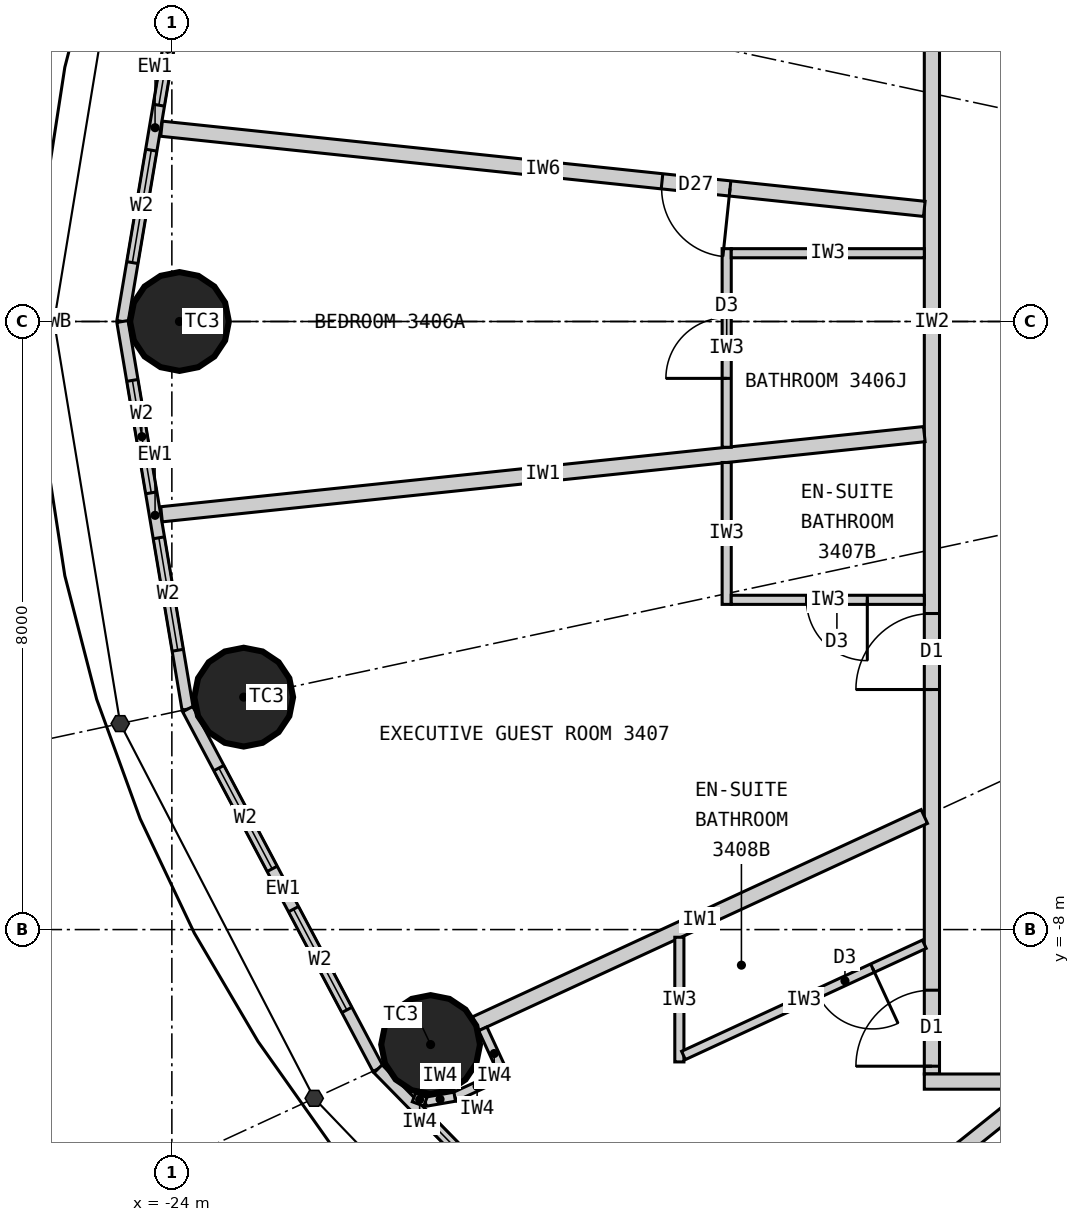
"""IFC4 building model, lengths in metres.
Left out: names, types, materials, properties, quantities, classifications, styles, units other than length and angle.
Written with IfcOpenShell. Run it as: python <this file> out.ifc"""

import sys

from ifc_helpers import new_model, si_unit, direction, frame, frame_2d, origin, origin_2d, place, context, subcontext, project, spatial, rectangle, circle, extrude, element, fill, save


model = new_model("IFC4")
c1 = context("Model", 3, precision=1e-05, world=origin(), true_north=direction((0.0, 1.0)))
c2 = subcontext(c1, "Body", "Model", "MODEL_VIEW")
j1 = project(units=[si_unit("LENGTHUNIT", "METRE"), si_unit("PLANEANGLEUNIT", "RADIAN")], contexts=[c1])
p1 = place(None, origin())
s1 = spatial("IfcSite", under=j1, at=p1, CompositionType="ELEMENT")
p2 = place(p1, origin())
s2 = spatial("IfcBuilding", under=s1, at=p2, CompositionType="ELEMENT")
p3 = place(p2, frame((0.0, 0.0, 132.0)))
s3 = spatial("IfcBuildingStorey", under=s2, at=p3, CompositionType="ELEMENT", Elevation=132.0)
for number, where, z_axis, x_axis in (
    (1, (-23.9, 0.0, 0.0), (0.0, 0.0, 1.0), (1.0, 0.0, 0.0)),
    (2, (-23.055, -4.942, 0.0), (0.0, 0.0, 1.0), (1.0, 0.0, 0.0)),
    (3, (-20.596, -9.513, 0.0), (0.0, 0.0, 1.0), (1.0, 0.0, 0.0)),
):
    element("IfcColumn", number, at=place(p3, frame(where, z_axis=z_axis, x_axis=x_axis)), inside=s3, PredefinedType="COLUMN", context=c2, shape_type="SweptSolid", body=[
        extrude(circle(Radius=0.65, at=origin_2d()), origin(), (0.0, 0.0, 1.0), 3.3),
    ])
p4 = place(p3, frame((-23.792, 5.1, 0.0), z_axis=(0.0, 0.0, 1.0), x_axis=(-0.165883894218, -0.986145290329, 0.0)))
e4 = element("IfcWall", 4, at=p4, inside=s3, PredefinedType="ELEMENTEDWALL", context=c2, shape_type="SweptSolid", body=[
    extrude(rectangle(XDim=5.172, YDim=0.15, at=frame_2d((2.586, 0.0))), origin(), (0.0, 0.0, 1.0), 3.12),
])
p5 = place(p4, frame((0.786, 0.0, 0.9)))
e5 = element("IfcOpeningElement", 5, at=p5, cuts=e4, PredefinedType="OPENING", context=c2, shape_type="SweptSolid", body=[
    extrude(rectangle(XDim=1.5, YDim=1.9, at=frame_2d((0.75, 0.95))), frame((0.0, 0.085, 0.0), z_axis=(0.0, -1.0, 0.0), x_axis=(1.0, 0.0, 0.0)), (0.0, 0.0, 1.0), 0.17),
])
p6 = place(p4, frame((2.886, 0.0, 0.9)))
e6 = element("IfcOpeningElement", 6, at=p6, cuts=e4, PredefinedType="OPENING", context=c2, shape_type="SweptSolid", body=[
    extrude(rectangle(XDim=1.5, YDim=1.9, at=frame_2d((0.75, 0.95))), frame((0.0, 0.085, 0.0), z_axis=(0.0, -1.0, 0.0), x_axis=(1.0, 0.0, 0.0)), (0.0, 0.0, 1.0), 0.17),
])
p7 = place(p3, frame((-24.65, 0.0, 0.0), z_axis=(0.0, 0.0, 1.0), x_axis=(0.165883894218, -0.986145290329, 0.0)))
e7 = element("IfcWall", 7, at=p7, inside=s3, PredefinedType="ELEMENTEDWALL", context=c2, shape_type="SweptSolid", body=[
    extrude(rectangle(XDim=5.172, YDim=0.15, at=frame_2d((2.586, 0.0))), origin(), (0.0, 0.0, 1.0), 3.12),
])
p8 = place(p7, frame((0.786, 0.0, 0.9)))
e8 = element("IfcOpeningElement", 8, at=p8, cuts=e7, PredefinedType="OPENING", context=c2, shape_type="SweptSolid", body=[
    extrude(rectangle(XDim=1.5, YDim=1.9, at=frame_2d((0.75, 0.95))), frame((0.0, 0.085, 0.0), z_axis=(0.0, -1.0, 0.0), x_axis=(1.0, 0.0, 0.0)), (0.0, 0.0, 1.0), 0.17),
])
p9 = place(p7, frame((2.886, 0.0, 0.9)))
e9 = element("IfcOpeningElement", 9, at=p9, cuts=e7, PredefinedType="OPENING", context=c2, shape_type="SweptSolid", body=[
    extrude(rectangle(XDim=1.5, YDim=1.9, at=frame_2d((0.75, 0.95))), frame((0.0, 0.085, 0.0), z_axis=(0.0, -1.0, 0.0), x_axis=(1.0, 0.0, 0.0)), (0.0, 0.0, 1.0), 0.17),
])
p10 = place(p3, frame((-23.792, -5.1, 0.0), z_axis=(0.0, 0.0, 1.0), x_axis=(0.467814388454, -0.883826735257, 0.0)))
e10 = element("IfcWall", 10, at=p10, inside=s3, PredefinedType="ELEMENTEDWALL", context=c2, shape_type="SweptSolid", body=[
    extrude(rectangle(XDim=5.354, YDim=0.15, at=frame_2d((2.677, 0.0))), origin(), (0.0, 0.0, 1.0), 3.12),
])
p11 = place(p10, frame((0.877, 0.0, 0.9)))
e11 = element("IfcOpeningElement", 11, at=p11, cuts=e10, PredefinedType="OPENING", context=c2, shape_type="SweptSolid", body=[
    extrude(rectangle(XDim=1.5, YDim=1.9, at=frame_2d((0.75, 0.95))), frame((0.0, 0.085, 0.0), z_axis=(0.0, -1.0, 0.0), x_axis=(1.0, 0.0, 0.0)), (0.0, 0.0, 1.0), 0.17),
])
p12 = place(p10, frame((2.977, 0.0, 0.9)))
e12 = element("IfcOpeningElement", 12, at=p12, cuts=e10, PredefinedType="OPENING", context=c2, shape_type="SweptSolid", body=[
    extrude(rectangle(XDim=1.5, YDim=1.9, at=frame_2d((0.75, 0.95))), frame((0.0, 0.085, 0.0), z_axis=(0.0, -1.0, 0.0), x_axis=(1.0, 0.0, 0.0)), (0.0, 0.0, 1.0), 0.17),
])
p13 = place(p3, frame((-21.287, -9.832, 0.0), z_axis=(0.0, 0.0, 1.0), x_axis=(0.700136650834, -0.714008872605, 0.0)))
e13 = element("IfcWall", 13, at=p13, inside=s3, PredefinedType="ELEMENTEDWALL", context=c2, shape_type="SweptSolid", body=[
    extrude(rectangle(XDim=5.649, YDim=0.15, at=frame_2d((2.825, 0.0))), origin(), (0.0, 0.0, 1.0), 3.12),
])
p14 = place(p13, frame((1.025, 0.0, 0.9)))
e14 = element("IfcOpeningElement", 14, at=p14, cuts=e13, PredefinedType="OPENING", context=c2, shape_type="SweptSolid", body=[
    extrude(rectangle(XDim=1.5, YDim=1.9, at=frame_2d((0.75, 0.95))), frame((0.0, 0.085, 0.0), z_axis=(0.0, -1.0, 0.0), x_axis=(1.0, 0.0, 0.0)), (0.0, 0.0, 1.0), 0.17),
])
p15 = place(p13, frame((3.125, 0.0, 0.9)))
e15 = element("IfcOpeningElement", 15, at=p15, cuts=e13, PredefinedType="OPENING", context=c2, shape_type="SweptSolid", body=[
    extrude(rectangle(XDim=1.5, YDim=1.9, at=frame_2d((0.75, 0.95))), frame((0.0, 0.085, 0.0), z_axis=(0.0, -1.0, 0.0), x_axis=(1.0, 0.0, 0.0)), (0.0, 0.0, 1.0), 0.17),
])
p16 = place(p3, frame((-14.0, 9.9, 0.0), z_axis=(0.0, 0.0, 1.0), x_axis=(0.0, -1.0, 0.0)))
e16 = element("IfcWall", 16, at=p16, inside=s3, PredefinedType="PARTITIONING", context=c2, shape_type="SweptSolid", body=[
    extrude(rectangle(XDim=19.8, YDim=0.2, at=frame_2d((9.9, 0.0))), origin(), (0.0, 0.0, 1.0), 3.12),
])
p17 = place(p16, frame((2.822, 0.0, 0.0)))
e17 = element("IfcOpeningElement", 17, at=p17, cuts=e16, PredefinedType="OPENING", context=c2, shape_type="SweptSolid", body=[
    extrude(rectangle(XDim=1.0, YDim=2.2, at=frame_2d((0.5, 1.1))), frame((0.0, 0.11, 0.0), z_axis=(0.0, -1.0, 0.0), x_axis=(1.0, 0.0, 0.0)), (0.0, 0.0, 1.0), 0.22),
])
p18 = place(p16, frame((13.742, 0.0, 0.0)))
e18 = element("IfcOpeningElement", 18, at=p18, cuts=e16, PredefinedType="OPENING", context=c2, shape_type="SweptSolid", body=[
    extrude(rectangle(XDim=1.0, YDim=2.2, at=frame_2d((0.5, 1.1))), frame((0.0, 0.11, 0.0), z_axis=(0.0, -1.0, 0.0), x_axis=(1.0, 0.0, 0.0)), (0.0, 0.0, 1.0), 0.22),
])
p19 = place(p16, frame((18.698, 0.0, 0.0)))
e19 = element("IfcOpeningElement", 19, at=p19, cuts=e16, PredefinedType="OPENING", context=c2, shape_type="SweptSolid", body=[
    extrude(rectangle(XDim=1.0, YDim=2.2, at=frame_2d((0.5, 1.1))), frame((0.0, 0.11, 0.0), z_axis=(0.0, -1.0, 0.0), x_axis=(1.0, 0.0, 0.0)), (0.0, 0.0, 1.0), 0.22),
])
p20 = place(p3, frame((-3.283, -10.0, 0.0), z_axis=(0.0, 0.0, 1.0), x_axis=(-1.0, 0.0, 0.0)))
e20 = element("IfcWall", 20, at=p20, inside=s3, PredefinedType="PARTITIONING", context=c2, shape_type="SweptSolid", body=[
    extrude(rectangle(XDim=10.817, YDim=0.2, at=frame_2d((5.409, 0.0))), origin(), (0.0, 0.0, 1.0), 3.12),
])
p21 = place(p20, frame((6.482, 0.0, 0.0)))
e21 = element("IfcOpeningElement", 21, at=p21, cuts=e20, PredefinedType="OPENING", context=c2, shape_type="SweptSolid", body=[
    extrude(rectangle(XDim=1.0, YDim=2.2, at=frame_2d((0.5, 1.1))), frame((0.0, 0.11, 0.0), z_axis=(0.0, -1.0, 0.0), x_axis=(1.0, 0.0, 0.0)), (0.0, 0.0, 1.0), 0.22),
])
p22 = place(p3, frame((-14.1, 1.482, 0.0), z_axis=(0.0, 0.0, 1.0), x_axis=(-0.994523202615, 0.104516024894, 0.0)))
e22 = element("IfcWall", 22, at=p22, inside=s3, PredefinedType="PARTITIONING", context=c2, shape_type="SweptSolid", body=[
    extrude(rectangle(XDim=10.091, YDim=0.2, at=frame_2d((5.045, 0.0))), origin(), (0.0, 0.0, 1.0), 2.37),
])
p23 = place(p22, frame((2.57, 0.0, 0.0)))
e23 = element("IfcOpeningElement", 23, at=p23, cuts=e22, PredefinedType="OPENING", context=c2, shape_type="SweptSolid", body=[
    extrude(rectangle(XDim=0.9, YDim=2.1, at=frame_2d((0.45, 1.05))), frame((0.0, 0.11, 0.0), z_axis=(0.0, -1.0, 0.0), x_axis=(1.0, 0.0, 0.0)), (0.0, 0.0, 1.0), 0.22),
])
p24 = place(p3, frame((-14.1, -1.482, 0.0), z_axis=(0.0, 0.0, 1.0), x_axis=(-0.994523202615, -0.104516024894, 0.0)))
e24 = element("IfcWall", 24, at=p24, inside=s3, PredefinedType="PARTITIONING", context=c2, shape_type="SweptSolid", body=[
    extrude(rectangle(XDim=10.091, YDim=0.2, at=frame_2d((5.045, 0.0))), origin(), (0.0, 0.0, 1.0), 2.37),
])
p25 = place(p3, frame((-14.1, -6.512, 0.0), z_axis=(0.0, 0.0, 1.0), x_axis=(-0.907833019998, -0.419331858797, 0.0)))
e25 = element("IfcWall", 25, at=p25, inside=s3, PredefinedType="PARTITIONING", context=c2, shape_type="SweptSolid", body=[
    extrude(rectangle(XDim=6.505, YDim=0.2, at=frame_2d((3.252, 0.0))), origin(), (0.0, 0.0, 1.0), 2.22),
])
p26 = place(p3, frame((-12.625, -10.1, 0.0), z_axis=(0.0, 0.0, 1.0), x_axis=(-0.780863644897, -0.624701503182, 0.0)))
e26 = element("IfcWall", 26, at=p26, inside=s3, PredefinedType="PARTITIONING", context=c2, shape_type="SweptSolid", body=[
    extrude(rectangle(XDim=4.612, YDim=0.2, at=frame_2d((2.306, 0.0))), origin(), (0.0, 0.0, 1.0), 2.27),
])
p27 = place(p3, frame((-16.7, -1.655, 0.0), z_axis=(0.0, 0.0, 1.0), x_axis=(0.0, 1.0, 0.0)))
e27 = element("IfcWall", 27, at=p27, inside=s3, PredefinedType="PARTITIONING", context=c2, shape_type="SweptSolid", body=[
    extrude(rectangle(XDim=2.613, YDim=0.12, at=frame_2d((1.307, 0.0))), origin(), (0.0, 0.0, 1.0), 3.12),
])
p28 = place(p27, frame((0.906, 0.0, 0.0)))
e28 = element("IfcOpeningElement", 28, at=p28, cuts=e27, PredefinedType="OPENING", context=c2, shape_type="SweptSolid", body=[
    extrude(rectangle(XDim=0.8, YDim=2.1, at=frame_2d((0.4, 1.05))), frame((0.0, 0.07, 0.0), z_axis=(0.0, -1.0, 0.0), x_axis=(1.0, 0.0, 0.0)), (0.0, 0.0, 1.0), 0.14),
])
p29 = place(p3, frame((-14.1, 0.898, 0.0), z_axis=(0.0, 0.0, 1.0), x_axis=(-1.0, 0.0, 0.0)))
e29 = element("IfcWall", 29, at=p29, inside=s3, PredefinedType="PARTITIONING", context=c2, shape_type="SweptSolid", body=[
    extrude(rectangle(XDim=2.54, YDim=0.12, at=frame_2d((1.27, 0.0))), origin(), (0.0, 0.0, 1.0), 3.12),
])
p30 = place(p3, frame((-16.7, -1.855, 0.0), z_axis=(0.0, 0.0, 1.0), x_axis=(0.0, -1.0, 0.0)))
e30 = element("IfcWall", 30, at=p30, inside=s3, PredefinedType="PARTITIONING", context=c2, shape_type="SweptSolid", body=[
    extrude(rectangle(XDim=1.867, YDim=0.12, at=frame_2d((0.933, 0.0))), origin(), (0.0, 0.0, 1.0), 3.12),
])
p31 = place(p3, frame((-14.1, -3.662, 0.0), z_axis=(0.0, 0.0, 1.0), x_axis=(-1.0, 0.0, 0.0)))
e31 = element("IfcWall", 31, at=p31, inside=s3, PredefinedType="PARTITIONING", context=c2, shape_type="SweptSolid", body=[
    extrude(rectangle(XDim=2.54, YDim=0.12, at=frame_2d((1.27, 0.0))), origin(), (0.0, 0.0, 1.0), 2.27),
])
p32 = place(p31, frame((0.75, 0.0, 0.0)))
e32 = element("IfcOpeningElement", 32, at=p32, cuts=e31, PredefinedType="OPENING", context=c2, shape_type="SweptSolid", body=[
    extrude(rectangle(XDim=0.8, YDim=2.1, at=frame_2d((0.4, 1.05))), frame((0.0, 0.07, 0.0), z_axis=(0.0, -1.0, 0.0), x_axis=(1.0, 0.0, 0.0)), (0.0, 0.0, 1.0), 0.14),
])
p33 = place(p3, frame((-17.323, -8.101, 0.0), z_axis=(0.0, 0.0, 1.0), x_axis=(0.0, -1.0, 0.0)))
e33 = element("IfcWall", 33, at=p33, inside=s3, PredefinedType="PARTITIONING", context=c2, shape_type="SweptSolid", body=[
    extrude(rectangle(XDim=1.64, YDim=0.12, at=frame_2d((0.82, 0.0))), origin(), (0.0, 0.0, 1.0), 3.12),
])
p34 = place(p3, frame((-14.1, -8.193, 0.0), z_axis=(0.0, 0.0, 1.0), x_axis=(-0.907836493557, -0.419324338628, 0.0)))
e34 = element("IfcWall", 34, at=p34, inside=s3, PredefinedType="PARTITIONING", context=c2, shape_type="SweptSolid", body=[
    extrude(rectangle(XDim=3.49, YDim=0.12, at=frame_2d((1.745, 0.0))), origin(), (0.0, 0.0, 1.0), 3.12),
])
p35 = place(p34, frame((0.75, 0.0, 0.0)))
e35 = element("IfcOpeningElement", 35, at=p35, cuts=e34, PredefinedType="OPENING", context=c2, shape_type="SweptSolid", body=[
    extrude(rectangle(XDim=0.8, YDim=2.1, at=frame_2d((0.4, 1.05))), frame((0.0, 0.07, 0.0), z_axis=(0.0, -1.0, 0.0), x_axis=(1.0, 0.0, 0.0)), (0.0, 0.0, 1.0), 0.14),
])
p36 = place(p3, frame((-19.909, -9.306, 0.0), z_axis=(0.0, 0.0, 1.0), x_axis=(0.419296148934, -0.90784951368, 0.0)))
e36 = element("IfcWall", 36, at=p36, inside=s3, PredefinedType="PARTITIONING", context=c2, shape_type="SweptSolid", body=[
    extrude(rectangle(XDim=0.716, YDim=0.12, at=frame_2d((0.358, 0.0))), origin(), (0.0, 0.0, 1.0), 3.12),
])
p37 = place(p3, frame((-19.689, -9.926, 0.0), z_axis=(0.0, 0.0, 1.0), x_axis=(-0.907893409272, -0.419201094227, 0.0)))
e37 = element("IfcWall", 37, at=p37, inside=s3, PredefinedType="PARTITIONING", context=c2, shape_type="SweptSolid", body=[
    extrude(rectangle(XDim=0.65, YDim=0.12, at=frame_2d((0.325, 0.0))), origin(), (0.0, 0.0, 1.0), 3.12),
])
p38 = place(p3, frame((-20.279, -10.199, 0.0), z_axis=(0.0, 0.0, 1.0), x_axis=(-0.985380740712, -0.170366651181, 0.0)))
e38 = element("IfcWall", 38, at=p38, inside=s3, PredefinedType="PARTITIONING", context=c2, shape_type="SweptSolid", body=[
    extrude(rectangle(XDim=0.391, YDim=0.12, at=frame_2d((0.196, 0.0))), origin(), (0.0, 0.0, 1.0), 3.12),
])
p39 = place(p3, frame((-20.664, -10.265, 0.0), z_axis=(0.0, 0.0, 1.0), x_axis=(-0.938058651481, 0.346476501918, 0.0)))
e39 = element("IfcWall", 39, at=p39, inside=s3, PredefinedType="PARTITIONING", context=c2, shape_type="SweptSolid", body=[
    extrude(rectangle(XDim=0.161, YDim=0.12, at=frame_2d((0.081, 0.0))), origin(), (0.0, 0.0, 1.0), 3.12),
])
p40 = place(p5, origin())
e40 = element("IfcWindow", 40, at=p40, inside=s3, PartitioningType="SINGLE_PANEL", PredefinedType="WINDOW", context=c2, shape_type="SweptSolid", body=[
    extrude(rectangle(XDim=1.5, YDim=1.9, at=frame_2d((0.75, 0.95))), frame((0.0, 0.03, 0.0), z_axis=(0.0, -1.0, 0.0), x_axis=(1.0, 0.0, 0.0)), (0.0, 0.0, 1.0), 0.06),
])
fill(e5, e40)
p41 = place(p6, origin())
e41 = element("IfcWindow", 41, at=p41, inside=s3, PartitioningType="SINGLE_PANEL", PredefinedType="WINDOW", context=c2, shape_type="SweptSolid", body=[
    extrude(rectangle(XDim=1.5, YDim=1.9, at=frame_2d((0.75, 0.95))), frame((0.0, 0.03, 0.0), z_axis=(0.0, -1.0, 0.0), x_axis=(1.0, 0.0, 0.0)), (0.0, 0.0, 1.0), 0.06),
])
fill(e6, e41)
p42 = place(p8, origin())
e42 = element("IfcWindow", 42, at=p42, inside=s3, PartitioningType="SINGLE_PANEL", PredefinedType="WINDOW", context=c2, shape_type="SweptSolid", body=[
    extrude(rectangle(XDim=1.5, YDim=1.9, at=frame_2d((0.75, 0.95))), frame((0.0, 0.03, 0.0), z_axis=(0.0, -1.0, 0.0), x_axis=(1.0, 0.0, 0.0)), (0.0, 0.0, 1.0), 0.06),
])
fill(e8, e42)
p43 = place(p9, origin())
e43 = element("IfcWindow", 43, at=p43, inside=s3, PartitioningType="SINGLE_PANEL", PredefinedType="WINDOW", context=c2, shape_type="SweptSolid", body=[
    extrude(rectangle(XDim=1.5, YDim=1.9, at=frame_2d((0.75, 0.95))), frame((0.0, 0.03, 0.0), z_axis=(0.0, -1.0, 0.0), x_axis=(1.0, 0.0, 0.0)), (0.0, 0.0, 1.0), 0.06),
])
fill(e9, e43)
p44 = place(p11, origin())
e44 = element("IfcWindow", 44, at=p44, inside=s3, PartitioningType="SINGLE_PANEL", PredefinedType="WINDOW", context=c2, shape_type="SweptSolid", body=[
    extrude(rectangle(XDim=1.5, YDim=1.9, at=frame_2d((0.75, 0.95))), frame((0.0, 0.03, 0.0), z_axis=(0.0, -1.0, 0.0), x_axis=(1.0, 0.0, 0.0)), (0.0, 0.0, 1.0), 0.06),
])
fill(e11, e44)
p45 = place(p12, origin())
e45 = element("IfcWindow", 45, at=p45, inside=s3, PartitioningType="SINGLE_PANEL", PredefinedType="WINDOW", context=c2, shape_type="SweptSolid", body=[
    extrude(rectangle(XDim=1.5, YDim=1.9, at=frame_2d((0.75, 0.95))), frame((0.0, 0.03, 0.0), z_axis=(0.0, -1.0, 0.0), x_axis=(1.0, 0.0, 0.0)), (0.0, 0.0, 1.0), 0.06),
])
fill(e12, e45)
p46 = place(p14, origin())
e46 = element("IfcWindow", 46, at=p46, inside=s3, PartitioningType="SINGLE_PANEL", PredefinedType="WINDOW", context=c2, shape_type="SweptSolid", body=[
    extrude(rectangle(XDim=1.5, YDim=1.9, at=frame_2d((0.75, 0.95))), frame((0.0, 0.03, 0.0), z_axis=(0.0, -1.0, 0.0), x_axis=(1.0, 0.0, 0.0)), (0.0, 0.0, 1.0), 0.06),
])
fill(e14, e46)
p47 = place(p28, origin())
e47 = element("IfcDoor", 47, at=p47, inside=s3, OperationType="SINGLE_SWING_LEFT", PredefinedType="DOOR", context=c2, shape_type="SweptSolid", body=[
    extrude(rectangle(XDim=0.8, YDim=2.1, at=frame_2d((0.4, 1.05))), frame((0.0, 0.025, 0.0), z_axis=(0.0, -1.0, 0.0), x_axis=(1.0, 0.0, 0.0)), (0.0, 0.0, 1.0), 0.05),
])
fill(e28, e47)
p48 = place(p23, origin())
e48 = element("IfcDoor", 48, at=p48, inside=s3, OperationType="SINGLE_SWING_LEFT", PredefinedType="DOOR", context=c2, shape_type="SweptSolid", body=[
    extrude(rectangle(XDim=0.9, YDim=2.1, at=frame_2d((0.45, 1.05))), frame((0.0, 0.025, 0.0), z_axis=(0.0, -1.0, 0.0), x_axis=(1.0, 0.0, 0.0)), (0.0, 0.0, 1.0), 0.05),
])
fill(e23, e48)
p49 = place(p32, origin())
e49 = element("IfcDoor", 49, at=p49, inside=s3, OperationType="SINGLE_SWING_LEFT", PredefinedType="DOOR", context=c2, shape_type="SweptSolid", body=[
    extrude(rectangle(XDim=0.8, YDim=2.1, at=frame_2d((0.4, 1.05))), frame((0.0, 0.025, 0.0), z_axis=(0.0, -1.0, 0.0), x_axis=(1.0, 0.0, 0.0)), (0.0, 0.0, 1.0), 0.05),
])
fill(e32, e49)
p50 = place(p18, origin())
e50 = element("IfcDoor", 50, at=p50, inside=s3, OperationType="SINGLE_SWING_RIGHT", PredefinedType="DOOR", context=c2, shape_type="SweptSolid", body=[
    extrude(rectangle(XDim=1.0, YDim=2.2, at=frame_2d((0.5, 1.1))), frame((0.0, 0.025, 0.0), z_axis=(0.0, -1.0, 0.0), x_axis=(1.0, 0.0, 0.0)), (0.0, 0.0, 1.0), 0.05),
])
fill(e18, e50)
p51 = place(p35, origin())
e51 = element("IfcDoor", 51, at=p51, inside=s3, OperationType="SINGLE_SWING_LEFT", PredefinedType="DOOR", context=c2, shape_type="SweptSolid", body=[
    extrude(rectangle(XDim=0.8, YDim=2.1, at=frame_2d((0.4, 1.05))), frame((0.0, 0.025, 0.0), z_axis=(0.0, -1.0, 0.0), x_axis=(1.0, 0.0, 0.0)), (0.0, 0.0, 1.0), 0.05),
])
fill(e35, e51)
p52 = place(p19, origin())
e52 = element("IfcDoor", 52, at=p52, inside=s3, OperationType="SINGLE_SWING_RIGHT", PredefinedType="DOOR", context=c2, shape_type="SweptSolid", body=[
    extrude(rectangle(XDim=1.0, YDim=2.2, at=frame_2d((0.5, 1.1))), frame((0.0, 0.025, 0.0), z_axis=(0.0, -1.0, 0.0), x_axis=(1.0, 0.0, 0.0)), (0.0, 0.0, 1.0), 0.05),
])
fill(e19, e52)
save(model, sys.argv[1])
